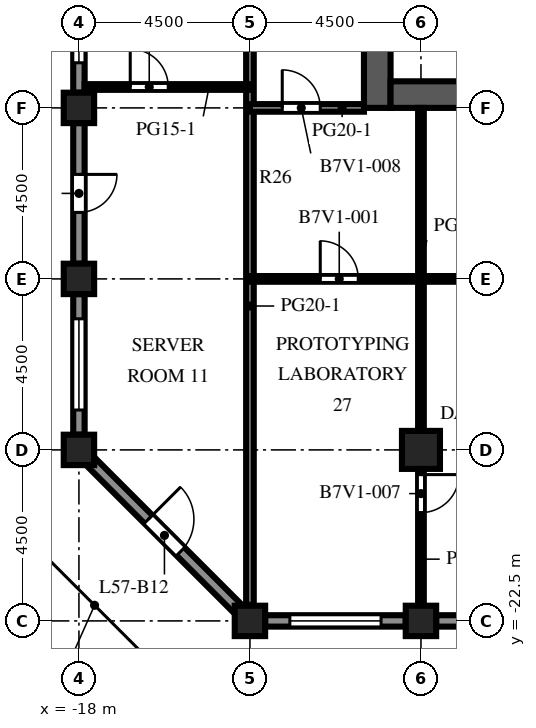
"""IFC4 building model, lengths in metres.
Left out: names, types, materials, properties, quantities, classifications, styles, units other than length and angle.
Written with IfcOpenShell. Run it as: python <this file> out.ifc"""

import sys

from ifc_helpers import new_model, si_unit, direction, frame, frame_2d, origin, origin_2d, place, context, subcontext, project, spatial, rectangle, extrude, element, fill, save


model = new_model("IFC4")
c1 = context("Model", 3, precision=1e-05, world=origin(), true_north=direction((0.0, 1.0)))
c2 = subcontext(c1, "Body", "Model", "MODEL_VIEW")
j1 = project(units=[si_unit("LENGTHUNIT", "METRE"), si_unit("PLANEANGLEUNIT", "RADIAN")], contexts=[c1])
p1 = place(None, origin())
s1 = spatial("IfcSite", under=j1, at=p1, CompositionType="ELEMENT")
p2 = place(p1, origin())
s2 = spatial("IfcBuilding", under=s1, at=p2, CompositionType="ELEMENT")
p3 = place(p2, frame((0.0, 0.0, 252.1)))
s3 = spatial("IfcBuildingStorey", under=s2, at=p3, CompositionType="ELEMENT", Elevation=252.1)
for number, where, z_axis, x_axis in (
    (1, (-18.0, -18.0, 0.0), (0.0, 0.0, 1.0), (1.0, 0.0, 0.0)),
    (2, (-18.0, -13.5, 0.0), (0.0, 0.0, 1.0), (1.0, 0.0, 0.0)),
    (3, (-18.0, -9.0, 0.0), (0.0, 0.0, 1.0), (1.0, 0.0, 0.0)),
    (4, (-13.5, -22.5, 0.0), (0.0, 0.0, 1.0), (1.0, 0.0, 0.0)),
    (5, (-9.0, -22.5, 0.0), (0.0, 0.0, 1.0), (1.0, 0.0, 0.0)),
):
    element("IfcColumn", number, at=place(p3, frame(where, z_axis=z_axis, x_axis=x_axis)), inside=s3, PredefinedType="COLUMN", context=c2, shape_type="SweptSolid", body=[
        extrude(rectangle(XDim=0.8, YDim=0.8, at=origin_2d()), origin(), (0.0, 0.0, 1.0), 4.1),
    ])
p4 = place(p3, frame((-9.0, -18.0, 0.0), z_axis=(0.0, 0.0, 1.0), x_axis=(1.0, 0.0, 0.0)))
e6 = element("IfcColumn", 6, at=p4, inside=s3, PredefinedType="COLUMN", context=c2, shape_type="SweptSolid", body=[
    extrude(rectangle(XDim=1.0, YDim=1.0, at=origin_2d()), origin(), (0.0, 0.0, 1.0), 4.1),
])
p5 = place(p3, frame((-10.15, -9.0, 0.0), z_axis=(0.0, 0.0, 1.0), x_axis=(0.0, 1.0, 0.0)))
e7 = element("IfcWall", 7, at=p5, inside=s3, PredefinedType="SHEAR", context=c2, shape_type="SweptSolid", body=[
    extrude(rectangle(XDim=27.5, YDim=0.7, at=frame_2d((13.75, 0.0))), origin(), (0.0, 0.0, 1.0), 4.1),
])
p6 = place(p5, frame((12.55, 0.0, 0.0)))
e8 = element("IfcOpeningElement", 8, at=p6, cuts=e7, PredefinedType="OPENING", context=c2, shape_type="SweptSolid", body=[
    extrude(rectangle(XDim=2.4, YDim=2.4, at=frame_2d((1.2, 1.2))), frame((0.0, 0.36, 0.0), z_axis=(0.0, -1.0, 0.0), x_axis=(1.0, 0.0, 0.0)), (0.0, 0.0, 1.0), 0.72),
])
p7 = place(p5, frame((6.825, 0.0, 0.0)))
e9 = element("IfcOpeningElement", 9, at=p7, cuts=e7, PredefinedType="OPENING", context=c2, shape_type="SweptSolid", body=[
    extrude(rectangle(XDim=1.2, YDim=2.1, at=frame_2d((0.6, 1.05))), frame((0.0, 0.36, 0.0), z_axis=(0.0, -1.0, 0.0), x_axis=(1.0, 0.0, 0.0)), (0.0, 0.0, 1.0), 0.72),
])
p8 = place(p5, frame((19.475, 0.0, 0.0)))
e10 = element("IfcOpeningElement", 10, at=p8, cuts=e7, PredefinedType="OPENING", context=c2, shape_type="SweptSolid", body=[
    extrude(rectangle(XDim=1.2, YDim=2.1, at=frame_2d((0.6, 1.05))), frame((0.0, 0.36, 0.0), z_axis=(0.0, -1.0, 0.0), x_axis=(1.0, 0.0, 0.0)), (0.0, 0.0, 1.0), 0.72),
])
p9 = place(p3, frame((-9.8, -8.65, 0.0), z_axis=(0.0, 0.0, 1.0), x_axis=(1.0, 0.0, 0.0)))
e11 = element("IfcWall", 11, at=p9, inside=s3, PredefinedType="SHEAR", context=c2, shape_type="SweptSolid", body=[
    extrude(rectangle(XDim=10.6, YDim=0.7, at=frame_2d((5.3, 0.0))), origin(), (0.0, 0.0, 1.0), 4.1),
])
p10 = place(p3, frame((-9.4, -22.5, 0.0), z_axis=(0.0, 0.0, 1.0), x_axis=(-1.0, 0.0, 0.0)))
e12 = element("IfcWall", 12, at=p10, inside=s3, PredefinedType="SOLIDWALL", context=c2, shape_type="SweptSolid", body=[
    extrude(rectangle(XDim=3.7, YDim=0.3, at=frame_2d((1.85, 0.0))), origin(), (0.0, 0.0, 1.0), 2.85),
])
p11 = place(p10, frame((0.65, 0.0, 0.8)))
e13 = element("IfcOpeningElement", 13, at=p11, cuts=e12, PredefinedType="OPENING", context=c2, shape_type="SweptSolid", body=[
    extrude(rectangle(XDim=2.4, YDim=1.7, at=frame_2d((1.2, 0.85))), frame((0.0, 0.16, 0.0), z_axis=(0.0, -1.0, 0.0), x_axis=(1.0, 0.0, 0.0)), (0.0, 0.0, 1.0), 0.32),
])
p12 = place(p3, frame((-4.9, -22.5, 0.0), z_axis=(0.0, 0.0, 1.0), x_axis=(-1.0, 0.0, 0.0)))
e14 = element("IfcWall", 14, at=p12, inside=s3, PredefinedType="SOLIDWALL", context=c2, shape_type="SweptSolid", body=[
    extrude(rectangle(XDim=3.7, YDim=0.3, at=frame_2d((1.85, 0.0))), origin(), (0.0, 0.0, 1.0), 2.85),
])
p13 = place(p12, frame((1.35, 0.0, 0.0)))
e15 = element("IfcOpeningElement", 15, at=p13, cuts=e14, PredefinedType="OPENING", context=c2, shape_type="SweptSolid", body=[
    extrude(rectangle(XDim=1.0, YDim=2.2, at=frame_2d((0.5, 1.1))), frame((0.0, 0.16, 0.0), z_axis=(0.0, -1.0, 0.0), x_axis=(1.0, 0.0, 0.0)), (0.0, 0.0, 1.0), 0.32),
])
p14 = place(p3, frame((-18.0, -8.6, 0.0), z_axis=(0.0, 0.0, 1.0), x_axis=(0.0, 1.0, 0.0)))
e16 = element("IfcWall", 16, at=p14, inside=s3, PredefinedType="SOLIDWALL", context=c2, shape_type="SweptSolid", body=[
    extrude(rectangle(XDim=3.7, YDim=0.3, at=frame_2d((1.85, 0.0))), origin(), (0.0, 0.0, 1.0), 2.85),
])
p15 = place(p14, frame((0.788, 0.0, 0.8)))
e17 = element("IfcOpeningElement", 17, at=p15, cuts=e16, PredefinedType="OPENING", context=c2, shape_type="SweptSolid", body=[
    extrude(rectangle(XDim=2.4, YDim=1.7, at=frame_2d((1.2, 0.85))), frame((0.0, 0.16, 0.0), z_axis=(0.0, -1.0, 0.0), x_axis=(1.0, 0.0, 0.0)), (0.0, 0.0, 1.0), 0.32),
])
p16 = place(p3, frame((-18.0, -13.1, 0.0), z_axis=(0.0, 0.0, 1.0), x_axis=(0.0, 1.0, 0.0)))
e18 = element("IfcWall", 18, at=p16, inside=s3, PredefinedType="SOLIDWALL", context=c2, shape_type="SweptSolid", body=[
    extrude(rectangle(XDim=3.7, YDim=0.3, at=frame_2d((1.85, 0.0))), origin(), (0.0, 0.0, 1.0), 2.85),
])
p17 = place(p16, frame((1.35, 0.0, 0.0)))
e19 = element("IfcOpeningElement", 19, at=p17, cuts=e18, PredefinedType="OPENING", context=c2, shape_type="SweptSolid", body=[
    extrude(rectangle(XDim=1.0, YDim=2.2, at=frame_2d((0.5, 1.1))), frame((0.0, 0.16, 0.0), z_axis=(0.0, -1.0, 0.0), x_axis=(1.0, 0.0, 0.0)), (0.0, 0.0, 1.0), 0.32),
])
p18 = place(p3, frame((-18.0, -17.6, 0.0), z_axis=(0.0, 0.0, 1.0), x_axis=(0.0, 1.0, 0.0)))
e20 = element("IfcWall", 20, at=p18, inside=s3, PredefinedType="SOLIDWALL", context=c2, shape_type="SweptSolid", body=[
    extrude(rectangle(XDim=3.7, YDim=0.3, at=frame_2d((1.85, 0.0))), origin(), (0.0, 0.0, 1.0), 2.85),
])
p19 = place(p18, frame((0.65, 0.0, 0.8)))
e21 = element("IfcOpeningElement", 21, at=p19, cuts=e20, PredefinedType="OPENING", context=c2, shape_type="SweptSolid", body=[
    extrude(rectangle(XDim=2.4, YDim=1.7, at=frame_2d((1.2, 0.85))), frame((0.0, 0.16, 0.0), z_axis=(0.0, -1.0, 0.0), x_axis=(1.0, 0.0, 0.0)), (0.0, 0.0, 1.0), 0.32),
])
p20 = place(p3, frame((-13.794, -22.206, 0.0), z_axis=(0.0, 0.0, 1.0), x_axis=(-0.707106781187, 0.707106781187, 0.0)))
e22 = element("IfcWall", 22, at=p20, inside=s3, PredefinedType="SOLIDWALL", context=c2, shape_type="SweptSolid", body=[
    extrude(rectangle(XDim=5.532, YDim=0.3, at=frame_2d((2.766, 0.0))), origin(), (0.0, 0.0, 1.0), 2.85),
])
p21 = place(p20, frame((2.166, 0.0, 0.0)))
e23 = element("IfcOpeningElement", 23, at=p21, cuts=e22, PredefinedType="OPENING", context=c2, shape_type="SweptSolid", body=[
    extrude(rectangle(XDim=1.2, YDim=2.2, at=frame_2d((0.6, 1.1))), frame((0.0, 0.16, 0.0), z_axis=(0.0, -1.0, 0.0), x_axis=(1.0, 0.0, 0.0)), (0.0, 0.0, 1.0), 0.32),
])
p22 = place(p3, frame((-13.5, -22.077, 0.0), z_axis=(0.0, 0.0, 1.0), x_axis=(0.0, 1.0, 0.0)))
e24 = element("IfcWall", 24, at=p22, inside=s3, PredefinedType="PARTITIONING", context=c2, shape_type="SweptSolid", body=[
    extrude(rectangle(XDim=25.327, YDim=0.2, at=frame_2d((12.664, 0.0))), origin(), (0.0, 0.0, 1.0), 3.65),
])
p23 = place(p22, frame((15.727, 0.0, 0.0)))
e25 = element("IfcOpeningElement", 25, at=p23, cuts=e24, PredefinedType="OPENING", context=c2, shape_type="SweptSolid", body=[
    extrude(rectangle(XDim=1.0, YDim=2.1, at=frame_2d((0.5, 1.05))), frame((0.0, 0.11, 0.0), z_axis=(0.0, -1.0, 0.0), x_axis=(1.0, 0.0, 0.0)), (0.0, 0.0, 1.0), 0.22),
])
p24 = place(p3, frame((-9.0, -18.5, 0.0), z_axis=(0.0, 0.0, 1.0), x_axis=(0.0, -1.0, 0.0)))
e26 = element("IfcWall", 26, at=p24, inside=s3, PredefinedType="PARTITIONING", context=c2, shape_type="SweptSolid", body=[
    extrude(rectangle(XDim=3.6, YDim=0.15, at=frame_2d((1.8, 0.0))), origin(), (0.0, 0.0, 1.0), 3.65),
])
p25 = place(p24, frame((0.15, 0.0, 0.0)))
e27 = element("IfcOpeningElement", 27, at=p25, cuts=e26, PredefinedType="OPENING", context=c2, shape_type="SweptSolid", body=[
    extrude(rectangle(XDim=1.0, YDim=2.1, at=frame_2d((0.5, 1.05))), frame((0.0, 0.085, 0.0), z_axis=(0.0, -1.0, 0.0), x_axis=(1.0, 0.0, 0.0)), (0.0, 0.0, 1.0), 0.17),
])
p26 = place(p3, frame((-9.0, -17.5, 0.0), z_axis=(0.0, 0.0, 1.0), x_axis=(0.0, 1.0, 0.0)))
e28 = element("IfcWall", 28, at=p26, inside=s3, PredefinedType="PARTITIONING", context=c2, shape_type="SweptSolid", body=[
    extrude(rectangle(XDim=8.5, YDim=0.15, at=frame_2d((4.25, 0.0))), origin(), (0.0, 0.0, 1.0), 3.65),
])
p27 = place(p3, frame((21.0, -13.5, 0.0), z_axis=(0.0, 0.0, 1.0), x_axis=(-1.0, 0.0, 0.0)))
e29 = element("IfcWall", 29, at=p27, inside=s3, PredefinedType="PARTITIONING", context=c2, shape_type="SweptSolid", body=[
    extrude(rectangle(XDim=34.5, YDim=0.15, at=frame_2d((17.25, 0.0))), origin(), (0.0, 0.0, 1.0), 3.65),
])
p28 = place(p27, frame((31.65, 0.0, 0.0)))
e30 = element("IfcOpeningElement", 30, at=p28, cuts=e29, PredefinedType="OPENING", context=c2, shape_type="SweptSolid", body=[
    extrude(rectangle(XDim=1.0, YDim=2.1, at=frame_2d((0.5, 1.05))), frame((0.0, 0.085, 0.0), z_axis=(0.0, -1.0, 0.0), x_axis=(1.0, 0.0, 0.0)), (0.0, 0.0, 1.0), 0.17),
])
p29 = place(p27, frame((22.15, 0.0, 0.0)))
e31 = element("IfcOpeningElement", 31, at=p29, cuts=e29, PredefinedType="OPENING", context=c2, shape_type="SweptSolid", body=[
    extrude(rectangle(XDim=1.0, YDim=2.1, at=frame_2d((0.5, 1.05))), frame((0.0, 0.085, 0.0), z_axis=(0.0, -1.0, 0.0), x_axis=(1.0, 0.0, 0.0)), (0.0, 0.0, 1.0), 0.17),
])
p30 = place(p27, frame((13.15, 0.0, 0.0)))
e32 = element("IfcOpeningElement", 32, at=p30, cuts=e29, PredefinedType="OPENING", context=c2, shape_type="SweptSolid", body=[
    extrude(rectangle(XDim=1.0, YDim=2.1, at=frame_2d((0.5, 1.05))), frame((0.0, 0.085, 0.0), z_axis=(0.0, -1.0, 0.0), x_axis=(1.0, 0.0, 0.0)), (0.0, 0.0, 1.0), 0.17),
])
p31 = place(p27, frame((6.15, 0.0, 0.0)))
e33 = element("IfcOpeningElement", 33, at=p31, cuts=e29, PredefinedType="OPENING", context=c2, shape_type="SweptSolid", body=[
    extrude(rectangle(XDim=1.0, YDim=2.1, at=frame_2d((0.5, 1.05))), frame((0.0, 0.085, 0.0), z_axis=(0.0, -1.0, 0.0), x_axis=(1.0, 0.0, 0.0)), (0.0, 0.0, 1.0), 0.17),
])
p32 = place(p3, frame((-10.5, -9.0, 0.0), z_axis=(0.0, 0.0, 1.0), x_axis=(-1.0, 0.0, 0.0)))
e34 = element("IfcWall", 34, at=p32, inside=s3, PredefinedType="PARTITIONING", context=c2, shape_type="SweptSolid", body=[
    extrude(rectangle(XDim=3.0, YDim=0.2, at=frame_2d((1.5, 0.0))), origin(), (0.0, 0.0, 1.0), 3.65),
])
p33 = place(p32, frame((1.15, 0.0, 0.0)))
e35 = element("IfcOpeningElement", 35, at=p33, cuts=e34, PredefinedType="OPENING", context=c2, shape_type="SweptSolid", body=[
    extrude(rectangle(XDim=1.0, YDim=2.1, at=frame_2d((0.5, 1.05))), frame((0.0, 0.11, 0.0), z_axis=(0.0, -1.0, 0.0), x_axis=(1.0, 0.0, 0.0)), (0.0, 0.0, 1.0), 0.22),
])
p34 = place(p3, frame((-13.5, -8.45, 0.0), z_axis=(0.0, 0.0, 1.0), x_axis=(-1.0, 0.0, 0.0)))
e36 = element("IfcWall", 36, at=p34, inside=s3, PredefinedType="PARTITIONING", context=c2, shape_type="SweptSolid", body=[
    extrude(rectangle(XDim=4.35, YDim=0.15, at=frame_2d((2.175, 0.0))), origin(), (0.0, 0.0, 1.0), 3.65),
])
p35 = place(p34, frame((2.15, 0.0, 0.0)))
e37 = element("IfcOpeningElement", 37, at=p35, cuts=e36, PredefinedType="OPENING", context=c2, shape_type="SweptSolid", body=[
    extrude(rectangle(XDim=1.0, YDim=2.1, at=frame_2d((0.5, 1.05))), frame((0.0, 0.085, 0.0), z_axis=(0.0, -1.0, 0.0), x_axis=(1.0, 0.0, 0.0)), (0.0, 0.0, 1.0), 0.17),
])
p36 = place(p11, origin())
e38 = element("IfcWindow", 38, at=p36, inside=s3, PartitioningType="SINGLE_PANEL", PredefinedType="WINDOW", context=c2, shape_type="SweptSolid", body=[
    extrude(rectangle(XDim=2.4, YDim=1.7, at=frame_2d((1.2, 0.85))), frame((0.0, 0.03, 0.0), z_axis=(0.0, -1.0, 0.0), x_axis=(1.0, 0.0, 0.0)), (0.0, 0.0, 1.0), 0.06),
])
fill(e13, e38)
p37 = place(p15, origin())
e39 = element("IfcWindow", 39, at=p37, inside=s3, PartitioningType="SINGLE_PANEL", PredefinedType="WINDOW", context=c2, shape_type="SweptSolid", body=[
    extrude(rectangle(XDim=2.4, YDim=1.7, at=frame_2d((1.2, 0.85))), frame((0.0, 0.03, 0.0), z_axis=(0.0, -1.0, 0.0), x_axis=(1.0, 0.0, 0.0)), (0.0, 0.0, 1.0), 0.06),
])
fill(e17, e39)
p38 = place(p17, origin())
e40 = element("IfcDoor", 40, at=p38, inside=s3, OperationType="SINGLE_SWING_RIGHT", PredefinedType="DOOR", context=c2, shape_type="SweptSolid", body=[
    extrude(rectangle(XDim=1.0, YDim=2.2, at=frame_2d((0.5, 1.1))), frame((0.0, 0.025, 0.0), z_axis=(0.0, -1.0, 0.0), x_axis=(1.0, 0.0, 0.0)), (0.0, 0.0, 1.0), 0.05),
])
fill(e19, e40)
p39 = place(p19, origin())
e41 = element("IfcWindow", 41, at=p39, inside=s3, PartitioningType="SINGLE_PANEL", PredefinedType="WINDOW", context=c2, shape_type="SweptSolid", body=[
    extrude(rectangle(XDim=2.4, YDim=1.7, at=frame_2d((1.2, 0.85))), frame((0.0, 0.03, 0.0), z_axis=(0.0, -1.0, 0.0), x_axis=(1.0, 0.0, 0.0)), (0.0, 0.0, 1.0), 0.06),
])
fill(e21, e41)
p40 = place(p21, origin())
e42 = element("IfcDoor", 42, at=p40, inside=s3, OperationType="SINGLE_SWING_RIGHT", PredefinedType="DOOR", context=c2, shape_type="SweptSolid", body=[
    extrude(rectangle(XDim=1.2, YDim=2.2, at=frame_2d((0.6, 1.1))), frame((0.0, 0.025, 0.0), z_axis=(0.0, -1.0, 0.0), x_axis=(1.0, 0.0, 0.0)), (0.0, 0.0, 1.0), 0.05),
])
fill(e23, e42)
p41 = place(p28, origin())
e43 = element("IfcDoor", 43, at=p41, inside=s3, OperationType="SINGLE_SWING_RIGHT", PredefinedType="DOOR", context=c2, shape_type="SweptSolid", body=[
    extrude(rectangle(XDim=1.0, YDim=2.1, at=frame_2d((0.5, 1.05))), frame((0.0, 0.025, 0.0), z_axis=(0.0, -1.0, 0.0), x_axis=(1.0, 0.0, 0.0)), (0.0, 0.0, 1.0), 0.05),
])
fill(e30, e43)
p42 = place(p25, origin())
e44 = element("IfcDoor", 44, at=p42, inside=s3, OperationType="SINGLE_SWING_LEFT", PredefinedType="DOOR", context=c2, shape_type="SweptSolid", body=[
    extrude(rectangle(XDim=1.0, YDim=2.1, at=frame_2d((0.5, 1.05))), frame((0.0, 0.025, 0.0), z_axis=(0.0, -1.0, 0.0), x_axis=(1.0, 0.0, 0.0)), (0.0, 0.0, 1.0), 0.05),
])
fill(e27, e44)
p43 = place(p33, origin())
e45 = element("IfcDoor", 45, at=p43, inside=s3, OperationType="SINGLE_SWING_RIGHT", PredefinedType="DOOR", context=c2, shape_type="SweptSolid", body=[
    extrude(rectangle(XDim=1.0, YDim=2.1, at=frame_2d((0.5, 1.05))), frame((0.0, 0.025, 0.0), z_axis=(0.0, -1.0, 0.0), x_axis=(1.0, 0.0, 0.0)), (0.0, 0.0, 1.0), 0.05),
])
fill(e35, e45)
p44 = place(p35, origin())
e46 = element("IfcDoor", 46, at=p44, inside=s3, OperationType="SINGLE_SWING_RIGHT", PredefinedType="DOOR", context=c2, shape_type="SweptSolid", body=[
    extrude(rectangle(XDim=1.0, YDim=2.1, at=frame_2d((0.5, 1.05))), frame((0.0, 0.025, 0.0), z_axis=(0.0, -1.0, 0.0), x_axis=(1.0, 0.0, 0.0)), (0.0, 0.0, 1.0), 0.05),
])
fill(e37, e46)
save(model, sys.argv[1])
